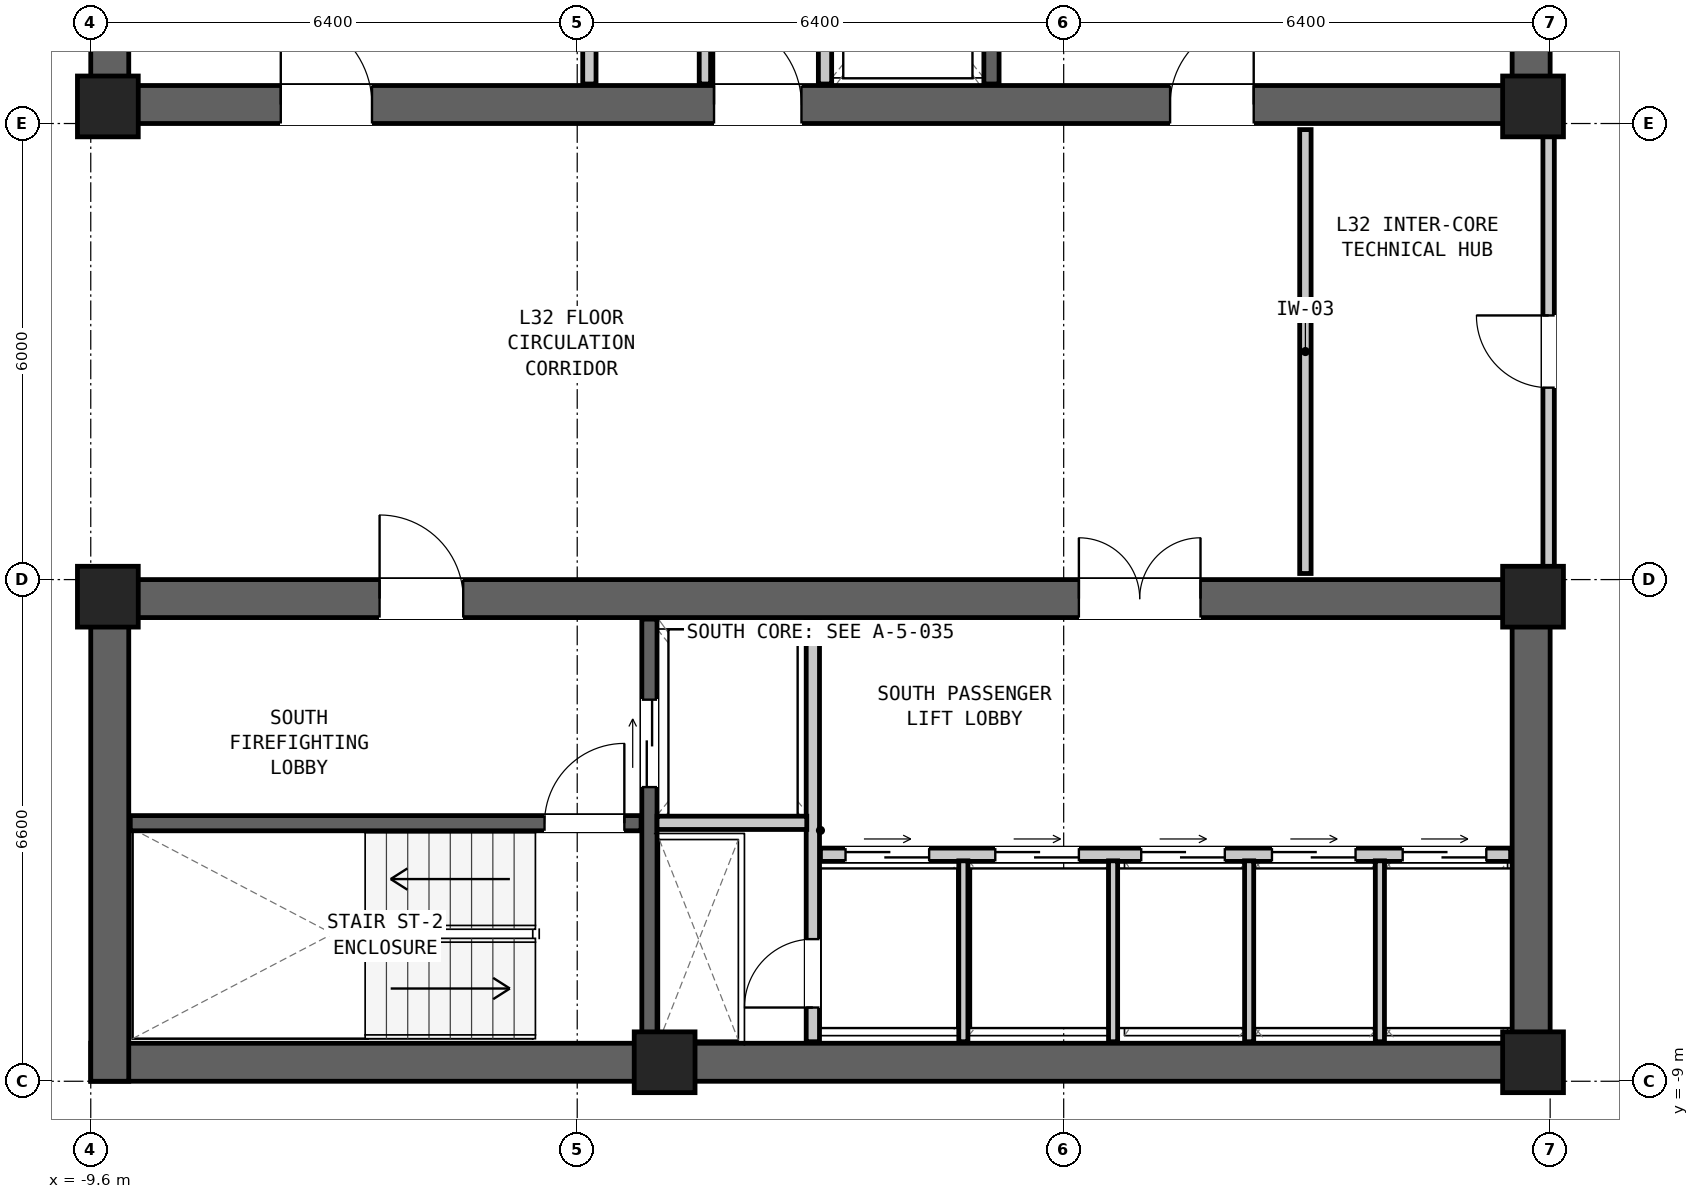
"""IFC4 building model, lengths in metres.
Left out: names, types, materials, properties, quantities, classifications, styles, units other than length and angle.
Written with IfcOpenShell. Run it as: python <this file> out.ifc"""

import sys

from ifc_helpers import new_model, si_unit, direction, frame, frame_2d, origin, origin_2d, place, context, subcontext, project, spatial, rectangle, extrude, element, fill, save


model = new_model("IFC4")
c1 = context("Model", 3, precision=1e-05, world=origin(), true_north=direction((0.0, 1.0)))
c2 = subcontext(c1, "Body", "Model", "MODEL_VIEW")
j1 = project(units=[si_unit("LENGTHUNIT", "METRE"), si_unit("PLANEANGLEUNIT", "RADIAN")], contexts=[c1])
p1 = place(None, origin())
s1 = spatial("IfcSite", under=j1, at=p1, CompositionType="ELEMENT")
p2 = place(p1, origin())
s2 = spatial("IfcBuilding", under=s1, at=p2, CompositionType="ELEMENT")
p3 = place(p2, frame((0.0, 0.0, 112.8)))
s3 = spatial("IfcBuildingStorey", under=s2, at=p3, CompositionType="ELEMENT", Elevation=112.8)
p4 = place(p3, frame((-9.6, 3.85, 0.0), z_axis=(0.0, 0.0, 1.0), x_axis=(1.0, 0.0, 0.0)))
e1 = element("IfcWall", 1, at=p4, inside=s3, PredefinedType="SHEAR", context=c2, shape_type="SweptSolid", body=[
    extrude(rectangle(XDim=19.2, YDim=0.5, at=frame_2d((9.6, 0.0))), origin(), (0.0, 0.0, 1.0), 3.05),
])
p5 = place(p4, frame((14.2, 0.0, 0.0)))
e2 = element("IfcOpeningElement", 2, at=p5, cuts=e1, PredefinedType="OPENING", context=c2, shape_type="SweptSolid", body=[
    extrude(rectangle(XDim=1.1, YDim=2.08, at=frame_2d((0.55, 1.04))), frame((0.0, 0.262, 0.0), z_axis=(0.0, -1.0, 0.0), x_axis=(1.0, 0.0, 0.0)), (0.0, 0.0, 1.0), 0.524),
])
p6 = place(p4, frame((8.2, 0.0, 0.0)))
e3 = element("IfcOpeningElement", 3, at=p6, cuts=e1, PredefinedType="OPENING", context=c2, shape_type="SweptSolid", body=[
    extrude(rectangle(XDim=1.15, YDim=2.1, at=frame_2d((0.575, 1.05))), frame((0.0, 0.262, 0.0), z_axis=(0.0, -1.0, 0.0), x_axis=(1.0, 0.0, 0.0)), (0.0, 0.0, 1.0), 0.524),
])
p7 = place(p4, frame((2.5, 0.0, 0.0)))
e4 = element("IfcOpeningElement", 4, at=p7, cuts=e1, PredefinedType="OPENING", context=c2, shape_type="SweptSolid", body=[
    extrude(rectangle(XDim=1.2, YDim=2.1, at=frame_2d((0.6, 1.05))), frame((0.0, 0.262, 0.0), z_axis=(0.0, -1.0, 0.0), x_axis=(1.0, 0.0, 0.0)), (0.0, 0.0, 1.0), 0.524),
])
for number, where, z_axis, x_axis in (
    (5, (-9.35, 3.6, 0.0), (0.0, 0.0, 1.0), (0.0, 1.0, 0.0)),
    (6, (9.35, 3.6, 0.0), (0.0, 0.0, 1.0), (0.0, 1.0, 0.0)),
):
    element("IfcWall", number, at=place(p3, frame(where, z_axis=z_axis, x_axis=x_axis)), inside=s3, PredefinedType="SHEAR", context=c2, shape_type="SweptSolid", body=[
        extrude(rectangle(XDim=6.6, YDim=0.5, at=frame_2d((3.3, 0.0))), origin(), (0.0, 0.0, 1.0), 3.05),
    ])
p8 = place(p3, frame((-9.6, -8.75, 0.0), z_axis=(0.0, 0.0, 1.0), x_axis=(1.0, 0.0, 0.0)))
e7 = element("IfcWall", 7, at=p8, inside=s3, PredefinedType="SHEAR", context=c2, shape_type="SweptSolid", body=[
    extrude(rectangle(XDim=19.2, YDim=0.5, at=frame_2d((9.6, 0.0))), origin(), (0.0, 0.0, 1.0), 3.05),
])
p9 = place(p3, frame((-9.6, -2.65, 0.0), z_axis=(0.0, 0.0, 1.0), x_axis=(1.0, 0.0, 0.0)))
e8 = element("IfcWall", 8, at=p9, inside=s3, PredefinedType="SHEAR", context=c2, shape_type="SweptSolid", body=[
    extrude(rectangle(XDim=19.2, YDim=0.5, at=frame_2d((9.6, 0.0))), origin(), (0.0, 0.0, 1.0), 3.05),
])
p10 = place(p9, frame((3.8, 0.0, 0.0)))
e9 = element("IfcOpeningElement", 9, at=p10, cuts=e8, PredefinedType="OPENING", context=c2, shape_type="SweptSolid", body=[
    extrude(rectangle(XDim=1.1, YDim=2.08, at=frame_2d((0.55, 1.04))), frame((0.0, 0.262, 0.0), z_axis=(0.0, -1.0, 0.0), x_axis=(1.0, 0.0, 0.0)), (0.0, 0.0, 1.0), 0.524),
])
p11 = place(p9, frame((13.0, 0.0, 0.0)))
e10 = element("IfcOpeningElement", 10, at=p11, cuts=e8, PredefinedType="OPENING", context=c2, shape_type="SweptSolid", body=[
    extrude(rectangle(XDim=1.6, YDim=2.12, at=frame_2d((0.8, 1.06))), frame((0.0, 0.262, 0.0), z_axis=(0.0, -1.0, 0.0), x_axis=(1.0, 0.0, 0.0)), (0.0, 0.0, 1.0), 0.524),
])
for number, where, z_axis, x_axis in (
    (11, (-9.35, -9.0, 0.0), (0.0, 0.0, 1.0), (0.0, 1.0, 0.0)),
    (12, (9.35, -9.0, 0.0), (0.0, 0.0, 1.0), (0.0, 1.0, 0.0)),
):
    element("IfcWall", number, at=place(p3, frame(where, z_axis=z_axis, x_axis=x_axis)), inside=s3, PredefinedType="SHEAR", context=c2, shape_type="SweptSolid", body=[
        extrude(rectangle(XDim=6.6, YDim=0.5, at=frame_2d((3.3, 0.0))), origin(), (0.0, 0.0, 1.0), 3.05),
    ])
for number, where, z_axis, x_axis in (
    (13, (-9.375, 3.825, 0.0), (0.0, 0.0, 1.0), (1.0, 0.0, 0.0)),
    (14, (9.375, 3.825, 0.0), (0.0, 0.0, 1.0), (1.0, 0.0, 0.0)),
    (15, (-9.375, -2.625, 0.0), (0.0, 0.0, 1.0), (1.0, 0.0, 0.0)),
    (16, (9.375, -2.625, 0.0), (0.0, 0.0, 1.0), (1.0, 0.0, 0.0)),
    (17, (-2.05, -8.75, 0.0), (0.0, 0.0, 1.0), (1.0, 0.0, 0.0)),
    (18, (9.375, -8.75, 0.0), (0.0, 0.0, 1.0), (1.0, 0.0, 0.0)),
):
    element("IfcColumn", number, at=place(p3, frame(where, z_axis=z_axis, x_axis=x_axis)), inside=s3, PredefinedType="COLUMN", context=c2, shape_type="SweptSolid", body=[
        extrude(rectangle(XDim=0.8, YDim=0.8, at=origin_2d()), origin(), (0.0, 0.0, 1.0), 3.05),
    ])
p12 = place(p3, frame((2.25, 4.12, 0.0), z_axis=(0.0, 0.0, 1.0), x_axis=(0.0, 1.0, 0.0)))
e19 = element("IfcWall", 19, at=p12, inside=s3, PredefinedType="SHEAR", context=c2, shape_type="SweptSolid", body=[
    extrude(rectangle(XDim=5.56, YDim=0.2, at=frame_2d((2.78, 0.0))), origin(), (0.0, 0.0, 1.0), 2.83),
])
p13 = place(p12, frame((0.65, 0.0, 0.0)))
e20 = element("IfcOpeningElement", 20, at=p13, cuts=e19, PredefinedType="OPENING", context=c2, shape_type="SweptSolid", body=[
    extrude(rectangle(XDim=1.15, YDim=2.08, at=frame_2d((0.575, 1.04))), frame((0.0, 0.112, 0.0), z_axis=(0.0, -1.0, 0.0), x_axis=(1.0, 0.0, 0.0)), (0.0, 0.0, 1.0), 0.224),
])
p14 = place(p3, frame((0.06, 4.12, 0.0), z_axis=(0.0, 0.0, 1.0), x_axis=(0.0, 1.0, 0.0)))
e21 = element("IfcWall", 21, at=p14, inside=s3, PredefinedType="PARTITIONING", context=c2, shape_type="SweptSolid", body=[
    extrude(rectangle(XDim=5.56, YDim=0.175, at=frame_2d((2.78, 0.0))), origin(), (0.0, 0.0, 1.0), 2.83),
])
p15 = place(p14, frame((3.1, 0.0, 0.0)))
e22 = element("IfcOpeningElement", 22, at=p15, cuts=e21, PredefinedType="OPENING", context=c2, shape_type="SweptSolid", body=[
    extrude(rectangle(XDim=1.4, YDim=2.12, at=frame_2d((0.7, 1.06))), frame((0.0, 0.1, 0.0), z_axis=(0.0, -1.0, 0.0), x_axis=(1.0, 0.0, 0.0)), (0.0, 0.0, 1.0), 0.199),
])
p16 = place(p3, frame((-3.04, 4.12, 0.0), z_axis=(0.0, 0.0, 1.0), x_axis=(0.0, 1.0, 0.0)))
e23 = element("IfcWall", 23, at=p16, inside=s3, PredefinedType="PARTITIONING", context=c2, shape_type="SweptSolid", body=[
    extrude(rectangle(XDim=5.56, YDim=0.175, at=frame_2d((2.78, 0.0))), origin(), (0.0, 0.0, 1.0), 2.83),
])
p17 = place(p3, frame((-1.52, 4.12, 0.0), z_axis=(0.0, 0.0, 1.0), x_axis=(0.0, 1.0, 0.0)))
e24 = element("IfcWall", 24, at=p17, inside=s3, PredefinedType="PARTITIONING", context=c2, shape_type="SweptSolid", body=[
    extrude(rectangle(XDim=5.56, YDim=0.15, at=frame_2d((2.78, 0.0))), origin(), (0.0, 0.0, 1.0), 2.83),
])
p18 = place(p17, frame((4.38, 0.0, 0.0)))
e25 = element("IfcOpeningElement", 25, at=p18, cuts=e24, PredefinedType="OPENING", context=c2, shape_type="SweptSolid", body=[
    extrude(rectangle(XDim=0.9, YDim=2.05, at=frame_2d((0.45, 1.025))), frame((0.0, 0.087, 0.0), z_axis=(0.0, -1.0, 0.0), x_axis=(1.0, 0.0, 0.0)), (0.0, 0.0, 1.0), 0.174),
])
p19 = place(p17, frame((0.65, 0.0, 0.0)))
e26 = element("IfcOpeningElement", 26, at=p19, cuts=e24, PredefinedType="OPENING", context=c2, shape_type="SweptSolid", body=[
    extrude(rectangle(XDim=0.9, YDim=2.05, at=frame_2d((0.45, 1.025))), frame((0.0, 0.087, 0.0), z_axis=(0.0, -1.0, 0.0), x_axis=(1.0, 0.0, 0.0)), (0.0, 0.0, 1.0), 0.174),
])
p20 = place(p3, frame((-9.08, -5.605, 0.0), z_axis=(0.0, 0.0, 1.0), x_axis=(1.0, 0.0, 0.0)))
e27 = element("IfcWall", 27, at=p20, inside=s3, PredefinedType="SHEAR", context=c2, shape_type="SweptSolid", body=[
    extrude(rectangle(XDim=6.72, YDim=0.2, at=frame_2d((3.36, 0.0))), origin(), (0.0, 0.0, 1.0), 2.83),
])
p21 = place(p20, frame((5.45, 0.0, 0.0)))
e28 = element("IfcOpeningElement", 28, at=p21, cuts=e27, PredefinedType="OPENING", context=c2, shape_type="SweptSolid", body=[
    extrude(rectangle(XDim=1.05, YDim=2.08, at=frame_2d((0.525, 1.04))), frame((0.0, 0.112, 0.0), z_axis=(0.0, -1.0, 0.0), x_axis=(1.0, 0.0, 0.0)), (0.0, 0.0, 1.0), 0.224),
])
p22 = place(p3, frame((-2.25, -8.48, 0.0), z_axis=(0.0, 0.0, 1.0), x_axis=(0.0, 1.0, 0.0)))
e29 = element("IfcWall", 29, at=p22, inside=s3, PredefinedType="SHEAR", context=c2, shape_type="SweptSolid", body=[
    extrude(rectangle(XDim=5.56, YDim=0.2, at=frame_2d((2.78, 0.0))), origin(), (0.0, 0.0, 1.0), 2.83),
])
p23 = place(p22, frame((3.35, 0.0, 0.0)))
e30 = element("IfcOpeningElement", 30, at=p23, cuts=e29, PredefinedType="OPENING", context=c2, shape_type="SweptSolid", body=[
    extrude(rectangle(XDim=1.15, YDim=2.08, at=frame_2d((0.575, 1.04))), frame((0.0, 0.112, 0.0), z_axis=(0.0, -1.0, 0.0), x_axis=(1.0, 0.0, 0.0)), (0.0, 0.0, 1.0), 0.224),
])
p24 = place(p3, frame((-0.1, -8.48, 0.0), z_axis=(0.0, 0.0, 1.0), x_axis=(0.0, 1.0, 0.0)))
e31 = element("IfcWall", 31, at=p24, inside=s3, PredefinedType="PARTITIONING", context=c2, shape_type="SweptSolid", body=[
    extrude(rectangle(XDim=5.56, YDim=0.175, at=frame_2d((2.78, 0.0))), origin(), (0.0, 0.0, 1.0), 2.83),
])
p25 = place(p24, frame((0.45, 0.0, 0.0)))
e32 = element("IfcOpeningElement", 32, at=p25, cuts=e31, PredefinedType="OPENING", context=c2, shape_type="SweptSolid", body=[
    extrude(rectangle(XDim=0.9, YDim=2.05, at=frame_2d((0.45, 1.025))), frame((0.0, 0.1, 0.0), z_axis=(0.0, -1.0, 0.0), x_axis=(1.0, 0.0, 0.0)), (0.0, 0.0, 1.0), 0.199),
])
p26 = place(p3, frame((-2.15, -5.6, 0.0), z_axis=(0.0, 0.0, 1.0), x_axis=(1.0, 0.0, 0.0)))
e33 = element("IfcWall", 33, at=p26, inside=s3, PredefinedType="PARTITIONING", context=c2, shape_type="SweptSolid", body=[
    extrude(rectangle(XDim=1.97, YDim=0.175, at=frame_2d((0.985, 0.0))), origin(), (0.0, 0.0, 1.0), 2.83),
])
p27 = place(p3, frame((0.0, -6.02, 0.0), z_axis=(0.0, 0.0, 1.0), x_axis=(1.0, 0.0, 0.0)))
e34 = element("IfcWall", 34, at=p27, inside=s3, PredefinedType="PARTITIONING", context=c2, shape_type="SweptSolid", body=[
    extrude(rectangle(XDim=9.08, YDim=0.175, at=frame_2d((4.54, 0.0))), origin(), (0.0, 0.0, 1.0), 2.83),
])
p28 = place(p27, frame((0.33, 0.0, 0.0)))
e35 = element("IfcOpeningElement", 35, at=p28, cuts=e34, PredefinedType="OPENING", context=c2, shape_type="SweptSolid", body=[
    extrude(rectangle(XDim=1.1, YDim=2.06, at=frame_2d((0.55, 1.03))), frame((0.0, 0.1, 0.0), z_axis=(0.0, -1.0, 0.0), x_axis=(1.0, 0.0, 0.0)), (0.0, 0.0, 1.0), 0.199),
])
p29 = place(p27, frame((2.3, 0.0, 0.0)))
e36 = element("IfcOpeningElement", 36, at=p29, cuts=e34, PredefinedType="OPENING", context=c2, shape_type="SweptSolid", body=[
    extrude(rectangle(XDim=1.1, YDim=2.06, at=frame_2d((0.55, 1.03))), frame((0.0, 0.1, 0.0), z_axis=(0.0, -1.0, 0.0), x_axis=(1.0, 0.0, 0.0)), (0.0, 0.0, 1.0), 0.199),
])
p30 = place(p27, frame((4.22, 0.0, 0.0)))
e37 = element("IfcOpeningElement", 37, at=p30, cuts=e34, PredefinedType="OPENING", context=c2, shape_type="SweptSolid", body=[
    extrude(rectangle(XDim=1.1, YDim=2.06, at=frame_2d((0.55, 1.03))), frame((0.0, 0.1, 0.0), z_axis=(0.0, -1.0, 0.0), x_axis=(1.0, 0.0, 0.0)), (0.0, 0.0, 1.0), 0.199),
])
p31 = place(p27, frame((5.94, 0.0, 0.0)))
e38 = element("IfcOpeningElement", 38, at=p31, cuts=e34, PredefinedType="OPENING", context=c2, shape_type="SweptSolid", body=[
    extrude(rectangle(XDim=1.1, YDim=2.06, at=frame_2d((0.55, 1.03))), frame((0.0, 0.1, 0.0), z_axis=(0.0, -1.0, 0.0), x_axis=(1.0, 0.0, 0.0)), (0.0, 0.0, 1.0), 0.199),
])
p32 = place(p27, frame((7.66, 0.0, 0.0)))
e39 = element("IfcOpeningElement", 39, at=p32, cuts=e34, PredefinedType="OPENING", context=c2, shape_type="SweptSolid", body=[
    extrude(rectangle(XDim=1.1, YDim=2.06, at=frame_2d((0.55, 1.03))), frame((0.0, 0.1, 0.0), z_axis=(0.0, -1.0, 0.0), x_axis=(1.0, 0.0, 0.0)), (0.0, 0.0, 1.0), 0.199),
])
for number, where, z_axis, x_axis in (
    (40, (1.88, -8.48, 0.0), (0.0, 0.0, 1.0), (0.0, 1.0, 0.0)),
    (41, (3.85, -8.48, 0.0), (0.0, 0.0, 1.0), (0.0, 1.0, 0.0)),
    (42, (5.64, -8.48, 0.0), (0.0, 0.0, 1.0), (0.0, 1.0, 0.0)),
    (43, (7.36, -8.48, 0.0), (0.0, 0.0, 1.0), (0.0, 1.0, 0.0)),
):
    element("IfcWall", number, at=place(p3, frame(where, z_axis=z_axis, x_axis=x_axis)), inside=s3, PredefinedType="PARTITIONING", context=c2, shape_type="SweptSolid", body=[
        extrude(rectangle(XDim=2.38, YDim=0.12, at=frame_2d((1.19, 0.0))), origin(), (0.0, 0.0, 1.0), 2.83),
    ])
p33 = place(p3, frame((6.38, -2.32, 0.0), z_axis=(0.0, 0.0, 1.0), x_axis=(0.0, 1.0, 0.0)))
e44 = element("IfcWall", 44, at=p33, inside=s3, PredefinedType="PARTITIONING", context=c2, shape_type="SweptSolid", body=[
    extrude(rectangle(XDim=5.84, YDim=0.15, at=frame_2d((2.92, 0.0))), origin(), (0.0, 0.0, 1.0), 2.198),
])
p34 = place(p3, frame((9.58, -2.32, 0.0), z_axis=(0.0, 0.0, 1.0), x_axis=(0.0, 1.0, 0.0)))
e45 = element("IfcWall", 45, at=p34, inside=s3, PredefinedType="PARTITIONING", context=c2, shape_type="SweptSolid", body=[
    extrude(rectangle(XDim=5.84, YDim=0.15, at=frame_2d((2.92, 0.0))), origin(), (0.0, 0.0, 1.0), 2.198),
])
p35 = place(p34, frame((2.445, 0.0, 0.0)))
e46 = element("IfcOpeningElement", 46, at=p35, cuts=e45, PredefinedType="OPENING", context=c2, shape_type="SweptSolid", body=[
    extrude(rectangle(XDim=0.95, YDim=2.1, at=frame_2d((0.475, 1.05))), frame((0.0, 0.087, 0.0), z_axis=(0.0, -1.0, 0.0), x_axis=(1.0, 0.0, 0.0)), (0.0, 0.0, 1.0), 0.174),
])
p36 = place(p5, origin())
e47 = element("IfcDoor", 47, at=p36, inside=s3, OperationType="SINGLE_SWING_RIGHT", PredefinedType="DOOR", context=c2, shape_type="SweptSolid", body=[
    extrude(rectangle(XDim=1.1, YDim=2.08, at=frame_2d((0.55, 1.04))), frame((0.0, 0.025, 0.0), z_axis=(0.0, -1.0, 0.0), x_axis=(1.0, 0.0, 0.0)), (0.0, 0.0, 1.0), 0.05),
])
fill(e2, e47)
p37 = place(p6, origin())
e48 = element("IfcDoor", 48, at=p37, inside=s3, OperationType="SINGLE_SWING_LEFT", PredefinedType="DOOR", context=c2, shape_type="SweptSolid", body=[
    extrude(rectangle(XDim=1.15, YDim=2.1, at=frame_2d((0.575, 1.05))), frame((0.0, 0.025, 0.0), z_axis=(0.0, -1.0, 0.0), x_axis=(1.0, 0.0, 0.0)), (0.0, 0.0, 1.0), 0.05),
])
fill(e3, e48)
p38 = place(p7, origin())
e49 = element("IfcDoor", 49, at=p38, inside=s3, OperationType="SINGLE_SWING_LEFT", PredefinedType="DOOR", context=c2, shape_type="SweptSolid", body=[
    extrude(rectangle(XDim=1.2, YDim=2.1, at=frame_2d((0.6, 1.05))), frame((0.0, 0.025, 0.0), z_axis=(0.0, -1.0, 0.0), x_axis=(1.0, 0.0, 0.0)), (0.0, 0.0, 1.0), 0.05),
])
fill(e4, e49)
p39 = place(p21, origin())
e50 = element("IfcDoor", 50, at=p39, inside=s3, OperationType="SINGLE_SWING_RIGHT", PredefinedType="DOOR", context=c2, shape_type="SweptSolid", body=[
    extrude(rectangle(XDim=1.05, YDim=2.08, at=frame_2d((0.525, 1.04))), frame((0.0, 0.025, 0.0), z_axis=(0.0, -1.0, 0.0), x_axis=(1.0, 0.0, 0.0)), (0.0, 0.0, 1.0), 0.05),
])
fill(e28, e50)
p40 = place(p10, origin())
e51 = element("IfcDoor", 51, at=p40, inside=s3, OperationType="SINGLE_SWING_LEFT", PredefinedType="DOOR", context=c2, shape_type="SweptSolid", body=[
    extrude(rectangle(XDim=1.1, YDim=2.08, at=frame_2d((0.55, 1.04))), frame((0.0, 0.025, 0.0), z_axis=(0.0, -1.0, 0.0), x_axis=(1.0, 0.0, 0.0)), (0.0, 0.0, 1.0), 0.05),
])
fill(e9, e51)
p41 = place(p23, origin())
e52 = element("IfcDoor", 52, at=p41, inside=s3, OperationType="DOUBLE_DOOR_SLIDING", PredefinedType="DOOR", context=c2, shape_type="SweptSolid", body=[
    extrude(rectangle(XDim=1.15, YDim=2.08, at=frame_2d((0.575, 1.04))), frame((0.0, 0.025, 0.0), z_axis=(0.0, -1.0, 0.0), x_axis=(1.0, 0.0, 0.0)), (0.0, 0.0, 1.0), 0.05),
])
fill(e30, e52)
p42 = place(p25, origin())
e53 = element("IfcDoor", 53, at=p42, inside=s3, OperationType="SINGLE_SWING_LEFT", PredefinedType="DOOR", context=c2, shape_type="SweptSolid", body=[
    extrude(rectangle(XDim=0.9, YDim=2.05, at=frame_2d((0.45, 1.025))), frame((0.0, 0.025, 0.0), z_axis=(0.0, -1.0, 0.0), x_axis=(1.0, 0.0, 0.0)), (0.0, 0.0, 1.0), 0.05),
])
fill(e32, e53)
p43 = place(p28, origin())
e54 = element("IfcDoor", 54, at=p43, inside=s3, OperationType="DOUBLE_DOOR_SLIDING", PredefinedType="DOOR", context=c2, shape_type="SweptSolid", body=[
    extrude(rectangle(XDim=1.1, YDim=2.06, at=frame_2d((0.55, 1.03))), frame((0.0, 0.025, 0.0), z_axis=(0.0, -1.0, 0.0), x_axis=(1.0, 0.0, 0.0)), (0.0, 0.0, 1.0), 0.05),
])
fill(e35, e54)
p44 = place(p29, origin())
e55 = element("IfcDoor", 55, at=p44, inside=s3, OperationType="DOUBLE_DOOR_SLIDING", PredefinedType="DOOR", context=c2, shape_type="SweptSolid", body=[
    extrude(rectangle(XDim=1.1, YDim=2.06, at=frame_2d((0.55, 1.03))), frame((0.0, 0.025, 0.0), z_axis=(0.0, -1.0, 0.0), x_axis=(1.0, 0.0, 0.0)), (0.0, 0.0, 1.0), 0.05),
])
fill(e36, e55)
p45 = place(p11, origin())
e56 = element("IfcDoor", 56, at=p45, inside=s3, OperationType="DOUBLE_DOOR_SINGLE_SWING", PredefinedType="DOOR", context=c2, shape_type="SweptSolid", body=[
    extrude(rectangle(XDim=1.6, YDim=2.12, at=frame_2d((0.8, 1.06))), frame((0.0, 0.025, 0.0), z_axis=(0.0, -1.0, 0.0), x_axis=(1.0, 0.0, 0.0)), (0.0, 0.0, 1.0), 0.05),
])
fill(e10, e56)
p46 = place(p35, origin())
e57 = element("IfcDoor", 57, at=p46, inside=s3, OperationType="SINGLE_SWING_RIGHT", PredefinedType="DOOR", context=c2, shape_type="SweptSolid", body=[
    extrude(rectangle(XDim=0.95, YDim=2.1, at=frame_2d((0.475, 1.05))), frame((0.0, 0.025, 0.0), z_axis=(0.0, -1.0, 0.0), x_axis=(1.0, 0.0, 0.0)), (0.0, 0.0, 1.0), 0.05),
])
fill(e46, e57)
p47 = place(p30, origin())
e58 = element("IfcDoor", 58, at=p47, inside=s3, OperationType="DOUBLE_DOOR_SLIDING", PredefinedType="DOOR", context=c2, shape_type="SweptSolid", body=[
    extrude(rectangle(XDim=1.1, YDim=2.06, at=frame_2d((0.55, 1.03))), frame((0.0, 0.025, 0.0), z_axis=(0.0, -1.0, 0.0), x_axis=(1.0, 0.0, 0.0)), (0.0, 0.0, 1.0), 0.05),
])
fill(e37, e58)
p48 = place(p31, origin())
e59 = element("IfcDoor", 59, at=p48, inside=s3, OperationType="DOUBLE_DOOR_SLIDING", PredefinedType="DOOR", context=c2, shape_type="SweptSolid", body=[
    extrude(rectangle(XDim=1.1, YDim=2.06, at=frame_2d((0.55, 1.03))), frame((0.0, 0.025, 0.0), z_axis=(0.0, -1.0, 0.0), x_axis=(1.0, 0.0, 0.0)), (0.0, 0.0, 1.0), 0.05),
])
fill(e38, e59)
p49 = place(p32, origin())
e60 = element("IfcDoor", 60, at=p49, inside=s3, OperationType="DOUBLE_DOOR_SLIDING", PredefinedType="DOOR", context=c2, shape_type="SweptSolid", body=[
    extrude(rectangle(XDim=1.1, YDim=2.06, at=frame_2d((0.55, 1.03))), frame((0.0, 0.025, 0.0), z_axis=(0.0, -1.0, 0.0), x_axis=(1.0, 0.0, 0.0)), (0.0, 0.0, 1.0), 0.05),
])
fill(e39, e60)
save(model, sys.argv[1])
